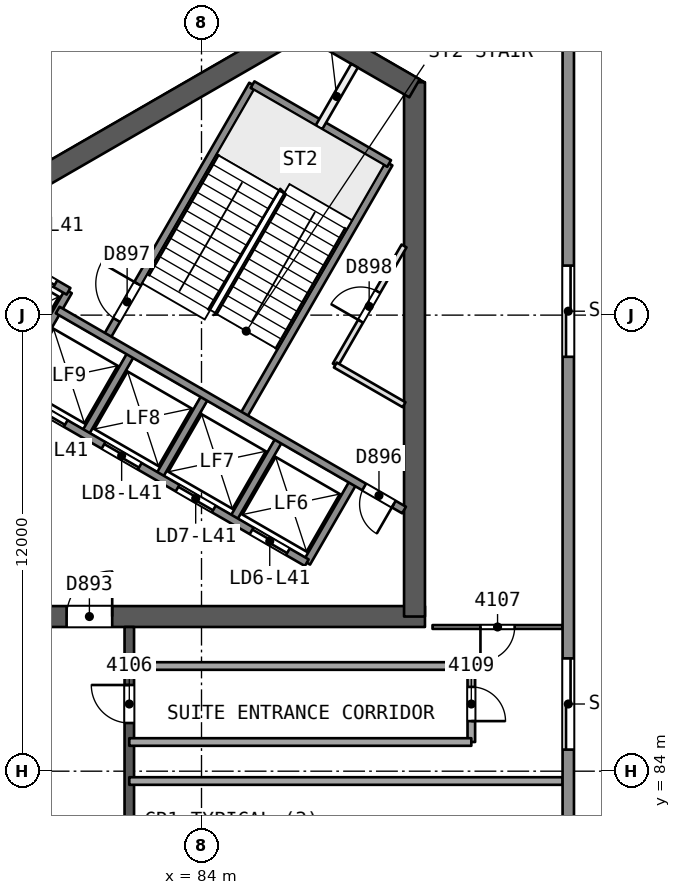
"""IFC4 building model, lengths in metres.
Left out: names, types, materials, properties, quantities, classifications, styles, units other than length and angle.
Written with IfcOpenShell. Run it as: python <this file> out.ifc"""

import sys

from ifc_helpers import new_model, si_unit, direction, frame, frame_2d, origin, place, context, subcontext, project, spatial, rectangle, extrude, element, fill, save


model = new_model("IFC4")
c1 = context("Model", 3, precision=1e-05, world=origin(), true_north=direction((0.0, 1.0)))
c2 = subcontext(c1, "Body", "Model", "MODEL_VIEW")
j1 = project(units=[si_unit("LENGTHUNIT", "METRE"), si_unit("PLANEANGLEUNIT", "RADIAN")], contexts=[c1])
p1 = place(None, origin())
s1 = spatial("IfcSite", under=j1, at=p1, CompositionType="ELEMENT")
p2 = place(p1, origin())
s2 = spatial("IfcBuilding", under=s1, at=p2, CompositionType="ELEMENT")
p3 = place(p2, frame((0.0, 0.0, 171.1)))
s3 = spatial("IfcBuildingStorey", under=s2, at=p3, CompositionType="ELEMENT", Elevation=171.1)
p4 = place(p3, frame((79.659, 88.069, 0.0), z_axis=(0.0, 0.0, 1.0), x_axis=(1.0, 0.0, 0.0)))
e1 = element("IfcWall", 1, at=p4, inside=s3, PredefinedType="SHEAR", context=c2, shape_type="SweptSolid", body=[
    extrude(rectangle(XDim=10.221, YDim=0.55, at=frame_2d((5.111, 0.0))), origin(), (0.0, 0.0, 1.0), 3.7),
])
p5 = place(p4, frame((0.791, 0.0, 0.0)))
e2 = element("IfcOpeningElement", 2, at=p5, cuts=e1, PredefinedType="OPENING", context=c2, shape_type="SweptSolid", body=[
    extrude(rectangle(XDim=1.2, YDim=2.1, at=frame_2d((0.6, 1.05))), frame((0.0, 0.286, 0.0), z_axis=(0.0, -1.0, 0.0), x_axis=(1.0, 0.0, 0.0)), (0.0, 0.0, 1.0), 0.571),
])
p6 = place(p3, frame((89.605, 88.069, 0.0), z_axis=(0.0, 0.0, 1.0), x_axis=(0.0, 1.0, 0.0)))
e3 = element("IfcWall", 3, at=p6, inside=s3, PredefinedType="SHEAR", context=c2, shape_type="SweptSolid", body=[
    extrude(rectangle(XDim=14.058, YDim=0.55, at=frame_2d((7.029, 0.0))), origin(), (0.0, 0.0, 1.0), 3.7),
])
p7 = place(p3, frame((89.605, 101.969, 0.0), z_axis=(0.0, 0.0, 1.0), x_axis=(-0.865997833373, 0.500047750313, 0.0)))
e4 = element("IfcWall", 4, at=p7, inside=s3, PredefinedType="SHEAR", context=c2, shape_type="SweptSolid", body=[
    extrude(rectangle(XDim=3.487, YDim=0.55, at=frame_2d((1.743, 0.0))), origin(), (0.0, 0.0, 1.0), 3.7),
])
p8 = place(p3, frame((86.723, 103.633, 0.0), z_axis=(0.0, 0.0, 1.0), x_axis=(-0.866023530946, -0.500003243837, 0.0)))
e5 = element("IfcWall", 5, at=p8, inside=s3, PredefinedType="SHEAR", context=c2, shape_type="SweptSolid", body=[
    extrude(rectangle(XDim=14.175, YDim=0.55, at=frame_2d((7.087, 0.0))), origin(), (0.0, 0.0, 1.0), 3.7),
])
p9 = place(p3, frame((82.1, 72.206, 0.0), z_axis=(0.0, 0.0, 1.0), x_axis=(0.0, 1.0, 0.0)))
e6 = element("IfcWall", 6, at=p9, inside=s3, PredefinedType="SHEAR", context=c2, shape_type="SweptSolid", body=[
    extrude(rectangle(XDim=15.588, YDim=0.25, at=frame_2d((7.794, 0.0))), origin(), (0.0, 0.0, 1.0), 3.25),
])
p10 = place(p9, frame((2.618, 0.0, 0.0)))
e7 = element("IfcOpeningElement", 7, at=p10, cuts=e6, PredefinedType="OPENING", context=c2, shape_type="SweptSolid", body=[
    extrude(rectangle(XDim=1.0, YDim=2.1, at=frame_2d((0.5, 1.05))), frame((0.0, 0.135, 0.0), z_axis=(0.0, -1.0, 0.0), x_axis=(1.0, 0.0, 0.0)), (0.0, 0.0, 1.0), 0.271),
])
p11 = place(p9, frame((8.285, 0.0, 0.0)))
e8 = element("IfcOpeningElement", 8, at=p11, cuts=e6, PredefinedType="OPENING", context=c2, shape_type="SweptSolid", body=[
    extrude(rectangle(XDim=1.2, YDim=2.4, at=frame_2d((0.6, 1.2))), frame((0.0, 0.135, 0.0), z_axis=(0.0, -1.0, 0.0), x_axis=(1.0, 0.0, 0.0)), (0.0, 0.0, 1.0), 0.271),
])
p12 = place(p9, frame((13.062, 0.0, 0.0)))
e9 = element("IfcOpeningElement", 9, at=p12, cuts=e6, PredefinedType="OPENING", context=c2, shape_type="SweptSolid", body=[
    extrude(rectangle(XDim=1.0, YDim=2.1, at=frame_2d((0.5, 1.05))), frame((0.0, 0.135, 0.0), z_axis=(0.0, -1.0, 0.0), x_axis=(1.0, 0.0, 0.0)), (0.0, 0.0, 1.0), 0.271),
])
p13 = place(p3, frame((93.502, 83.741, 0.0), z_axis=(0.0, 0.0, 1.0), x_axis=(-1.0, 0.0, 0.0)))
e10 = element("IfcWall", 10, at=p13, inside=s3, PredefinedType="PARTITIONING", context=c2, shape_type="SweptSolid", body=[
    extrude(rectangle(XDim=11.402, YDim=0.2, at=frame_2d((5.701, 0.0))), origin(), (0.0, 0.0, 1.0), 3.25),
])
p14 = place(p3, frame((93.502, 87.794, 0.0), z_axis=(0.0, 0.0, 1.0), x_axis=(-1.0, 0.0, 0.0)))
e11 = element("IfcWall", 11, at=p14, inside=s3, PredefinedType="PARTITIONING", context=c2, shape_type="SweptSolid", body=[
    extrude(rectangle(XDim=3.423, YDim=0.1, at=frame_2d((1.712, 0.0))), origin(), (0.0, 0.0, 1.0), 3.25),
])
p15 = place(p14, frame((1.262, 0.0, 0.0)))
e12 = element("IfcOpeningElement", 12, at=p15, cuts=e11, PredefinedType="OPENING", context=c2, shape_type="SweptSolid", body=[
    extrude(rectangle(XDim=0.9, YDim=2.1, at=frame_2d((0.45, 1.05))), frame((0.0, 0.061, 0.0), z_axis=(0.0, -1.0, 0.0), x_axis=(1.0, 0.0, 0.0)), (0.0, 0.0, 1.0), 0.121),
])
p16 = place(p3, frame((82.1, 86.768, 0.0), z_axis=(0.0, 0.0, 1.0), x_axis=(1.0, 0.0, 0.0)))
e13 = element("IfcWall", 13, at=p16, inside=s3, PredefinedType="PARTITIONING", context=c2, shape_type="SweptSolid", body=[
    extrude(rectangle(XDim=9.0, YDim=0.2, at=frame_2d((4.5, 0.0))), origin(), (0.0, 0.0, 1.0), 3.25),
])
p17 = place(p3, frame((91.1, 86.768, 0.0), z_axis=(0.0, 0.0, 1.0), x_axis=(0.0, -1.0, 0.0)))
e14 = element("IfcWall", 14, at=p17, inside=s3, PredefinedType="PARTITIONING", context=c2, shape_type="SweptSolid", body=[
    extrude(rectangle(XDim=2.0, YDim=0.2, at=frame_2d((1.0, 0.0))), origin(), (0.0, 0.0, 1.0), 3.25),
])
p18 = place(p17, frame((0.55, 0.0, 0.0)))
e15 = element("IfcOpeningElement", 15, at=p18, cuts=e14, PredefinedType="OPENING", context=c2, shape_type="SweptSolid", body=[
    extrude(rectangle(XDim=0.9, YDim=2.1, at=frame_2d((0.45, 1.05))), frame((0.0, 0.11, 0.0), z_axis=(0.0, -1.0, 0.0), x_axis=(1.0, 0.0, 0.0)), (0.0, 0.0, 1.0), 0.221),
])
p19 = place(p3, frame((91.1, 84.768, 0.0), z_axis=(0.0, 0.0, 1.0), x_axis=(-1.0, 0.0, 0.0)))
e16 = element("IfcWall", 16, at=p19, inside=s3, PredefinedType="PARTITIONING", context=c2, shape_type="SweptSolid", body=[
    extrude(rectangle(XDim=9.0, YDim=0.2, at=frame_2d((4.5, 0.0))), origin(), (0.0, 0.0, 1.0), 3.25),
])
p20 = place(p3, frame((93.651, 106.818, 0.0), z_axis=(0.0, 0.0, 1.0), x_axis=(0.0, -1.0, 0.0)))
e17 = element("IfcWall", 17, at=p20, inside=s3, PredefinedType="SOLIDWALL", context=c2, shape_type="SweptSolid", body=[
    extrude(rectangle(XDim=53.635, YDim=0.3, at=frame_2d((26.818, 0.0))), origin(), (0.0, 0.0, 1.0), 3.25),
])
p21 = place(p20, frame((30.294, 0.0, 0.0)))
e18 = element("IfcOpeningElement", 18, at=p21, cuts=e17, PredefinedType="OPENING", context=c2, shape_type="SweptSolid", body=[
    extrude(rectangle(XDim=2.4, YDim=2.4, at=frame_2d((1.2, 1.2))), frame((0.0, 0.161, 0.0), z_axis=(0.0, -1.0, 0.0), x_axis=(1.0, 0.0, 0.0)), (0.0, 0.0, 1.0), 0.321),
])
p22 = place(p20, frame((41.683, 0.0, 0.0)))
e19 = element("IfcOpeningElement", 19, at=p22, cuts=e17, PredefinedType="OPENING", context=c2, shape_type="SweptSolid", body=[
    extrude(rectangle(XDim=2.4, YDim=2.4, at=frame_2d((1.2, 1.2))), frame((0.0, 0.161, 0.0), z_axis=(0.0, -1.0, 0.0), x_axis=(1.0, 0.0, 0.0)), (0.0, 0.0, 1.0), 0.321),
])
p23 = place(p20, frame((19.85, 0.0, 0.0)))
e20 = element("IfcOpeningElement", 20, at=p23, cuts=e17, PredefinedType="OPENING", context=c2, shape_type="SweptSolid", body=[
    extrude(rectangle(XDim=2.4, YDim=2.4, at=frame_2d((1.2, 1.2))), frame((0.0, 0.161, 0.0), z_axis=(0.0, -1.0, 0.0), x_axis=(1.0, 0.0, 0.0)), (0.0, 0.0, 1.0), 0.321),
])
p24 = place(p20, frame((9.514, 0.0, 0.0)))
e21 = element("IfcOpeningElement", 21, at=p24, cuts=e17, PredefinedType="OPENING", context=c2, shape_type="SweptSolid", body=[
    extrude(rectangle(XDim=2.4, YDim=2.4, at=frame_2d((1.2, 1.2))), frame((0.0, 0.161, 0.0), z_axis=(0.0, -1.0, 0.0), x_axis=(1.0, 0.0, 0.0)), (0.0, 0.0, 1.0), 0.321),
])
p25 = place(p20, frame((24.826, 0.0, 0.9)))
e22 = element("IfcOpeningElement", 22, at=p25, cuts=e17, PredefinedType="OPENING", context=c2, shape_type="SweptSolid", body=[
    extrude(rectangle(XDim=1.8, YDim=1.5, at=frame_2d((0.9, 0.75))), frame((0.0, 0.161, 0.0), z_axis=(0.0, -1.0, 0.0), x_axis=(1.0, 0.0, 0.0)), (0.0, 0.0, 1.0), 0.321),
])
p26 = place(p3, frame((42.45, 82.744, 0.0), z_axis=(0.0, 0.0, 1.0), x_axis=(0.866024128163, 0.500002209434, 0.0)))
e23 = element("IfcWall", 23, at=p26, inside=s3, PredefinedType="SOLIDWALL", context=c2, shape_type="SweptSolid", body=[
    extrude(rectangle(XDim=53.635, YDim=0.3, at=frame_2d((26.817, 0.0))), origin(), (0.0, 0.0, 1.0), 3.25),
])
p27 = place(p26, frame((20.473, 0.0, 0.0)))
e24 = element("IfcOpeningElement", 24, at=p27, cuts=e23, PredefinedType="OPENING", context=c2, shape_type="SweptSolid", body=[
    extrude(rectangle(XDim=2.4, YDim=2.4, at=frame_2d((1.2, 1.2))), frame((0.0, 0.161, 0.0), z_axis=(0.0, -1.0, 0.0), x_axis=(1.0, 0.0, 0.0)), (0.0, 0.0, 1.0), 0.321),
])
p28 = place(p26, frame((9.514, 0.0, 0.0)))
e25 = element("IfcOpeningElement", 25, at=p28, cuts=e23, PredefinedType="OPENING", context=c2, shape_type="SweptSolid", body=[
    extrude(rectangle(XDim=2.4, YDim=2.4, at=frame_2d((1.2, 1.2))), frame((0.0, 0.161, 0.0), z_axis=(0.0, -1.0, 0.0), x_axis=(1.0, 0.0, 0.0)), (0.0, 0.0, 1.0), 0.321),
])
p29 = place(p26, frame((40.628, 0.0, 0.0)))
e26 = element("IfcOpeningElement", 26, at=p29, cuts=e23, PredefinedType="OPENING", context=c2, shape_type="SweptSolid", body=[
    extrude(rectangle(XDim=2.4, YDim=2.4, at=frame_2d((1.2, 1.2))), frame((0.0, 0.161, 0.0), z_axis=(0.0, -1.0, 0.0), x_axis=(1.0, 0.0, 0.0)), (0.0, 0.0, 1.0), 0.321),
])
p30 = place(p26, frame((27.632, 0.0, 0.9)))
e27 = element("IfcOpeningElement", 27, at=p30, cuts=e23, PredefinedType="OPENING", context=c2, shape_type="SweptSolid", body=[
    extrude(rectangle(XDim=1.8, YDim=1.5, at=frame_2d((0.9, 0.75))), frame((0.0, 0.161, 0.0), z_axis=(0.0, -1.0, 0.0), x_axis=(1.0, 0.0, 0.0)), (0.0, 0.0, 1.0), 0.321),
])
p31 = place(p26, frame((24.826, 0.0, 0.9)))
e28 = element("IfcOpeningElement", 28, at=p31, cuts=e23, PredefinedType="OPENING", context=c2, shape_type="SweptSolid", body=[
    extrude(rectangle(XDim=1.8, YDim=1.5, at=frame_2d((0.9, 0.75))), frame((0.0, 0.161, 0.0), z_axis=(0.0, -1.0, 0.0), x_axis=(1.0, 0.0, 0.0)), (0.0, 0.0, 1.0), 0.321),
])
p32 = place(p3, frame((86.77, 89.486, 0.0), z_axis=(0.0, 0.0, 1.0), x_axis=(0.499961042966, 0.86604789447, 0.0)))
e29 = element("IfcWall", 29, at=p32, inside=s3, PredefinedType="SOLIDWALL", context=c2, shape_type="SweptSolid", body=[
    extrude(rectangle(XDim=2.48, YDim=0.2, at=frame_2d((1.24, 0.0))), origin(), (0.0, 0.0, 1.0), 3.25),
])
p33 = place(p3, frame((87.521, 94.687, 0.0), z_axis=(0.0, 0.0, 1.0), x_axis=(0.500043727655, 0.866000156139, 0.0)))
e30 = element("IfcWall", 30, at=p33, inside=s3, PredefinedType="PARTITIONING", context=c2, shape_type="SweptSolid", body=[
    extrude(rectangle(XDim=3.618, YDim=0.15, at=frame_2d((1.809, 0.0))), origin(), (0.0, 0.0, 1.0), 3.25),
])
p34 = place(p33, frame((1.332, 0.0, 0.0)))
e31 = element("IfcOpeningElement", 31, at=p34, cuts=e30, PredefinedType="OPENING", context=c2, shape_type="SweptSolid", body=[
    extrude(rectangle(XDim=0.9, YDim=2.1, at=frame_2d((0.45, 1.05))), frame((0.0, 0.085, 0.0), z_axis=(0.0, -1.0, 0.0), x_axis=(1.0, 0.0, 0.0)), (0.0, 0.0, 1.0), 0.171),
])
p35 = place(p3, frame((84.821, 90.611, 0.0), z_axis=(0.0, 0.0, 1.0), x_axis=(0.499961042966, 0.86604789447, 0.0)))
e32 = element("IfcWall", 32, at=p35, inside=s3, PredefinedType="SOLIDWALL", context=c2, shape_type="SweptSolid", body=[
    extrude(rectangle(XDim=2.48, YDim=0.2, at=frame_2d((1.24, 0.0))), origin(), (0.0, 0.0, 1.0), 3.25),
])
p36 = place(p3, frame((85.087, 93.321, 0.0), z_axis=(0.0, 0.0, 1.0), x_axis=(0.500019787375, 0.866013979237, 0.0)))
e33 = element("IfcWall", 33, at=p36, inside=s3, PredefinedType="SOLIDWALL", context=c2, shape_type="SweptSolid", body=[
    extrude(rectangle(XDim=7.7, YDim=0.2, at=frame_2d((3.85, 0.0))), origin(), (0.0, 0.0, 1.0), 3.25),
])
p37 = place(p3, frame((82.873, 91.736, 0.0), z_axis=(0.0, 0.0, 1.0), x_axis=(0.499961042966, 0.86604789447, 0.0)))
e34 = element("IfcWall", 34, at=p37, inside=s3, PredefinedType="SOLIDWALL", context=c2, shape_type="SweptSolid", body=[
    extrude(rectangle(XDim=2.48, YDim=0.2, at=frame_2d((1.24, 0.0))), origin(), (0.0, 0.0, 1.0), 3.25),
])
p38 = place(p3, frame((87.09, 100.94, 0.0), z_axis=(0.0, 0.0, 1.0), x_axis=(0.499951854219, 0.86605319898, 0.0)))
e35 = element("IfcWall", 35, at=p38, inside=s3, PredefinedType="PARTITIONING", context=c2, shape_type="SweptSolid", body=[
    extrude(rectangle(XDim=1.873, YDim=0.2, at=frame_2d((0.937, 0.0))), origin(), (0.0, 0.0, 1.0), 3.25),
])
p39 = place(p3, frame((80.924, 92.861, 0.0), z_axis=(0.0, 0.0, 1.0), x_axis=(0.499961042966, 0.86604789447, 0.0)))
e36 = element("IfcWall", 36, at=p39, inside=s3, PredefinedType="SOLIDWALL", context=c2, shape_type="SweptSolid", body=[
    extrude(rectangle(XDim=2.48, YDim=0.2, at=frame_2d((1.24, 0.0))), origin(), (0.0, 0.0, 1.0), 3.25),
])
p40 = place(p3, frame((81.493, 95.396, 0.0), z_axis=(0.0, 0.0, 1.0), x_axis=(0.500006057782, 0.866021906294, 0.0)))
e37 = element("IfcWall", 37, at=p40, inside=s3, PredefinedType="SOLIDWALL", context=c2, shape_type="SweptSolid", body=[
    extrude(rectangle(XDim=7.7, YDim=0.2, at=frame_2d((3.85, 0.0))), origin(), (0.0, 0.0, 1.0), 3.25),
])
p41 = place(p40, frame((0.55, 0.0, 0.0)))
e38 = element("IfcOpeningElement", 38, at=p41, cuts=e37, PredefinedType="OPENING", context=c2, shape_type="SweptSolid", body=[
    extrude(rectangle(XDim=1.1, YDim=2.1, at=frame_2d((0.55, 1.05))), frame((0.0, 0.11, 0.0), z_axis=(0.0, -1.0, 0.0), x_axis=(1.0, 0.0, 0.0)), (0.0, 0.0, 1.0), 0.221),
])
p42 = place(p3, frame((78.976, 93.986, 0.0), z_axis=(0.0, 0.0, 1.0), x_axis=(0.499944174705, 0.866057632134, 0.0)))
e39 = element("IfcWall", 39, at=p42, inside=s3, PredefinedType="SOLIDWALL", context=c2, shape_type="SweptSolid", body=[
    extrude(rectangle(XDim=3.05, YDim=0.2, at=frame_2d((1.525, 0.0))), origin(), (0.0, 0.0, 1.0), 3.25),
])
p43 = place(p3, frame((86.77, 89.486, 0.0), z_axis=(0.0, 0.0, 1.0), x_axis=(-0.86601811187, 0.500012629753, 0.0)))
e40 = element("IfcWall", 40, at=p43, inside=s3, PredefinedType="SOLIDWALL", context=c2, shape_type="SweptSolid", body=[
    extrude(rectangle(XDim=10.9, YDim=0.2, at=frame_2d((5.45, 0.0))), origin(), (0.0, 0.0, 1.0), 3.25),
])
p44 = place(p43, frame((0.575, 0.0, 0.0)))
e41 = element("IfcOpeningElement", 41, at=p44, cuts=e40, PredefinedType="OPENING", context=c2, shape_type="SweptSolid", body=[
    extrude(rectangle(XDim=1.1, YDim=2.1, at=frame_2d((0.55, 1.05))), frame((0.0, 0.11, 0.0), z_axis=(0.0, -1.0, 0.0), x_axis=(1.0, 0.0, 0.0)), (0.0, 0.0, 1.0), 0.221),
])
p45 = place(p43, frame((2.825, 0.0, 0.0)))
e42 = element("IfcOpeningElement", 42, at=p45, cuts=e40, PredefinedType="OPENING", context=c2, shape_type="SweptSolid", body=[
    extrude(rectangle(XDim=1.1, YDim=2.1, at=frame_2d((0.55, 1.05))), frame((0.0, 0.11, 0.0), z_axis=(0.0, -1.0, 0.0), x_axis=(1.0, 0.0, 0.0)), (0.0, 0.0, 1.0), 0.221),
])
p46 = place(p43, frame((5.075, 0.0, 0.0)))
e43 = element("IfcOpeningElement", 43, at=p46, cuts=e40, PredefinedType="OPENING", context=c2, shape_type="SweptSolid", body=[
    extrude(rectangle(XDim=1.1, YDim=2.1, at=frame_2d((0.55, 1.05))), frame((0.0, 0.11, 0.0), z_axis=(0.0, -1.0, 0.0), x_axis=(1.0, 0.0, 0.0)), (0.0, 0.0, 1.0), 0.221),
])
p47 = place(p43, frame((7.325, 0.0, 0.0)))
e44 = element("IfcOpeningElement", 44, at=p47, cuts=e40, PredefinedType="OPENING", context=c2, shape_type="SweptSolid", body=[
    extrude(rectangle(XDim=1.1, YDim=2.1, at=frame_2d((0.55, 1.05))), frame((0.0, 0.11, 0.0), z_axis=(0.0, -1.0, 0.0), x_axis=(1.0, 0.0, 0.0)), (0.0, 0.0, 1.0), 0.221),
])
p48 = place(p3, frame((89.33, 90.872, 0.0), z_axis=(0.0, 0.0, 1.0), x_axis=(-0.866027589512, 0.49999621419, 0.0)))
e45 = element("IfcWall", 45, at=p48, inside=s3, PredefinedType="SOLIDWALL", context=c2, shape_type="SweptSolid", body=[
    extrude(rectangle(XDim=10.524, YDim=0.2, at=frame_2d((5.262, 0.0))), origin(), (0.0, 0.0, 1.0), 3.25),
])
p49 = place(p48, frame((0.312, 0.0, 0.0)))
e46 = element("IfcOpeningElement", 46, at=p49, cuts=e45, PredefinedType="OPENING", context=c2, shape_type="SweptSolid", body=[
    extrude(rectangle(XDim=0.9, YDim=2.1, at=frame_2d((0.45, 1.05))), frame((0.0, 0.11, 0.0), z_axis=(0.0, -1.0, 0.0), x_axis=(1.0, 0.0, 0.0)), (0.0, 0.0, 1.0), 0.221),
])
p50 = place(p3, frame((80.5, 96.627, 0.0), z_axis=(0.0, 0.0, 1.0), x_axis=(-0.86601224135, 0.500022797313, 0.0)))
e47 = element("IfcWall", 47, at=p50, inside=s3, PredefinedType="SOLIDWALL", context=c2, shape_type="SweptSolid", body=[
    extrude(rectangle(XDim=1.9, YDim=0.2, at=frame_2d((0.95, 0.0))), origin(), (0.0, 0.0, 1.0), 3.25),
])
p51 = place(p50, frame((0.4, 0.0, 0.0)))
e48 = element("IfcOpeningElement", 48, at=p51, cuts=e47, PredefinedType="OPENING", context=c2, shape_type="SweptSolid", body=[
    extrude(rectangle(XDim=1.1, YDim=2.1, at=frame_2d((0.55, 1.05))), frame((0.0, 0.11, 0.0), z_axis=(0.0, -1.0, 0.0), x_axis=(1.0, 0.0, 0.0)), (0.0, 0.0, 1.0), 0.221),
])
p52 = place(p3, frame((89.33, 93.643, 0.0), z_axis=(0.0, 0.0, 1.0), x_axis=(-0.866033778982, 0.499985493453, 0.0)))
e49 = element("IfcWall", 49, at=p52, inside=s3, PredefinedType="PARTITIONING", context=c2, shape_type="SweptSolid", body=[
    extrude(rectangle(XDim=2.089, YDim=0.15, at=frame_2d((1.044, 0.0))), origin(), (0.0, 0.0, 1.0), 3.25),
])
p53 = place(p3, frame((88.937, 99.99, 0.0), z_axis=(0.0, 0.0, 1.0), x_axis=(-0.866004344652, 0.500036473714, 0.0)))
e50 = element("IfcWall", 50, at=p53, inside=s3, PredefinedType="SOLIDWALL", context=c2, shape_type="SweptSolid", body=[
    extrude(rectangle(XDim=4.15, YDim=0.2, at=frame_2d((2.075, 0.0))), origin(), (0.0, 0.0, 1.0), 3.25),
])
p54 = place(p12, origin())
e51 = element("IfcDoor", 51, at=p54, inside=s3, OperationType="SINGLE_SWING_RIGHT", PredefinedType="NOTDEFINED", context=c2, shape_type="SweptSolid", body=[
    extrude(rectangle(XDim=1.0, YDim=2.1, at=frame_2d((0.5, 1.05))), frame((0.0, 0.025, 0.0), z_axis=(0.0, -1.0, 0.0), x_axis=(1.0, 0.0, 0.0)), (0.0, 0.0, 1.0), 0.05),
])
fill(e9, e51)
p55 = place(p15, origin())
e52 = element("IfcDoor", 52, at=p55, inside=s3, OperationType="SINGLE_SWING_RIGHT", PredefinedType="NOTDEFINED", context=c2, shape_type="SweptSolid", body=[
    extrude(rectangle(XDim=0.9, YDim=2.1, at=frame_2d((0.45, 1.05))), frame((0.0, 0.025, 0.0), z_axis=(0.0, -1.0, 0.0), x_axis=(1.0, 0.0, 0.0)), (0.0, 0.0, 1.0), 0.05),
])
fill(e12, e52)
p56 = place(p18, origin())
e53 = element("IfcDoor", 53, at=p56, inside=s3, OperationType="SINGLE_SWING_RIGHT", PredefinedType="NOTDEFINED", context=c2, shape_type="SweptSolid", body=[
    extrude(rectangle(XDim=0.9, YDim=2.1, at=frame_2d((0.45, 1.05))), frame((0.0, 0.025, 0.0), z_axis=(0.0, -1.0, 0.0), x_axis=(1.0, 0.0, 0.0)), (0.0, 0.0, 1.0), 0.05),
])
fill(e15, e53)
p57 = place(p23, origin())
e54 = element("IfcDoor", 54, at=p57, inside=s3, OperationType="SLIDING_TO_LEFT", PredefinedType="NOTDEFINED", context=c2, shape_type="SweptSolid", body=[
    extrude(rectangle(XDim=2.4, YDim=2.4, at=frame_2d((1.2, 1.2))), frame((0.0, 0.025, 0.0), z_axis=(0.0, -1.0, 0.0), x_axis=(1.0, 0.0, 0.0)), (0.0, 0.0, 1.0), 0.05),
])
fill(e20, e54)
p58 = place(p24, origin())
e55 = element("IfcDoor", 55, at=p58, inside=s3, OperationType="SLIDING_TO_RIGHT", PredefinedType="NOTDEFINED", context=c2, shape_type="SweptSolid", body=[
    extrude(rectangle(XDim=2.4, YDim=2.4, at=frame_2d((1.2, 1.2))), frame((0.0, 0.025, 0.0), z_axis=(0.0, -1.0, 0.0), x_axis=(1.0, 0.0, 0.0)), (0.0, 0.0, 1.0), 0.05),
])
fill(e21, e55)
p59 = place(p5, origin())
e56 = element("IfcDoor", 56, at=p59, inside=s3, OperationType="SINGLE_SWING_RIGHT", PredefinedType="NOTDEFINED", context=c2, shape_type="SweptSolid", body=[
    extrude(rectangle(XDim=1.2, YDim=2.1, at=frame_2d((0.6, 1.05))), frame((0.0, 0.025, 0.0), z_axis=(0.0, -1.0, 0.0), x_axis=(1.0, 0.0, 0.0)), (0.0, 0.0, 1.0), 0.05),
])
fill(e2, e56)
p60 = place(p44, origin())
e57 = element("IfcDoor", 57, at=p60, inside=s3, OperationType="SLIDING_TO_RIGHT", PredefinedType="NOTDEFINED", context=c2, shape_type="SweptSolid", body=[
    extrude(rectangle(XDim=1.1, YDim=2.1, at=frame_2d((0.55, 1.05))), frame((0.0, 0.025, 0.0), z_axis=(0.0, -1.0, 0.0), x_axis=(1.0, 0.0, 0.0)), (0.0, 0.0, 1.0), 0.05),
])
fill(e41, e57)
p61 = place(p45, origin())
e58 = element("IfcDoor", 58, at=p61, inside=s3, OperationType="SLIDING_TO_LEFT", PredefinedType="NOTDEFINED", context=c2, shape_type="SweptSolid", body=[
    extrude(rectangle(XDim=1.1, YDim=2.1, at=frame_2d((0.55, 1.05))), frame((0.0, 0.025, 0.0), z_axis=(0.0, -1.0, 0.0), x_axis=(1.0, 0.0, 0.0)), (0.0, 0.0, 1.0), 0.05),
])
fill(e42, e58)
p62 = place(p46, origin())
e59 = element("IfcDoor", 59, at=p62, inside=s3, OperationType="SLIDING_TO_RIGHT", PredefinedType="NOTDEFINED", context=c2, shape_type="SweptSolid", body=[
    extrude(rectangle(XDim=1.1, YDim=2.1, at=frame_2d((0.55, 1.05))), frame((0.0, 0.025, 0.0), z_axis=(0.0, -1.0, 0.0), x_axis=(1.0, 0.0, 0.0)), (0.0, 0.0, 1.0), 0.05),
])
fill(e43, e59)
p63 = place(p47, origin())
e60 = element("IfcDoor", 60, at=p63, inside=s3, OperationType="SLIDING_TO_LEFT", PredefinedType="NOTDEFINED", context=c2, shape_type="SweptSolid", body=[
    extrude(rectangle(XDim=1.1, YDim=2.1, at=frame_2d((0.55, 1.05))), frame((0.0, 0.025, 0.0), z_axis=(0.0, -1.0, 0.0), x_axis=(1.0, 0.0, 0.0)), (0.0, 0.0, 1.0), 0.05),
])
fill(e44, e60)
p64 = place(p51, origin())
e61 = element("IfcDoor", 61, at=p64, inside=s3, OperationType="SLIDING_TO_RIGHT", PredefinedType="NOTDEFINED", context=c2, shape_type="SweptSolid", body=[
    extrude(rectangle(XDim=1.1, YDim=2.1, at=frame_2d((0.55, 1.05))), frame((0.0, 0.025, 0.0), z_axis=(0.0, -1.0, 0.0), x_axis=(1.0, 0.0, 0.0)), (0.0, 0.0, 1.0), 0.05),
])
fill(e48, e61)
p65 = place(p49, origin())
e62 = element("IfcDoor", 62, at=p65, inside=s3, OperationType="SINGLE_SWING_LEFT", PredefinedType="NOTDEFINED", context=c2, shape_type="SweptSolid", body=[
    extrude(rectangle(XDim=0.9, YDim=2.1, at=frame_2d((0.45, 1.05))), frame((0.0, 0.025, 0.0), z_axis=(0.0, -1.0, 0.0), x_axis=(1.0, 0.0, 0.0)), (0.0, 0.0, 1.0), 0.05),
])
fill(e46, e62)
p66 = place(p41, origin())
e63 = element("IfcDoor", 63, at=p66, inside=s3, OperationType="SINGLE_SWING_RIGHT", PredefinedType="NOTDEFINED", context=c2, shape_type="SweptSolid", body=[
    extrude(rectangle(XDim=1.1, YDim=2.1, at=frame_2d((0.55, 1.05))), frame((0.0, 0.025, 0.0), z_axis=(0.0, -1.0, 0.0), x_axis=(1.0, 0.0, 0.0)), (0.0, 0.0, 1.0), 0.05),
])
fill(e38, e63)
p67 = place(p34, origin())
e64 = element("IfcDoor", 64, at=p67, inside=s3, OperationType="SINGLE_SWING_LEFT", PredefinedType="NOTDEFINED", context=c2, shape_type="SweptSolid", body=[
    extrude(rectangle(XDim=0.9, YDim=2.1, at=frame_2d((0.45, 1.05))), frame((0.0, 0.025, 0.0), z_axis=(0.0, -1.0, 0.0), x_axis=(1.0, 0.0, 0.0)), (0.0, 0.0, 1.0), 0.05),
])
fill(e31, e64)
save(model, sys.argv[1])
